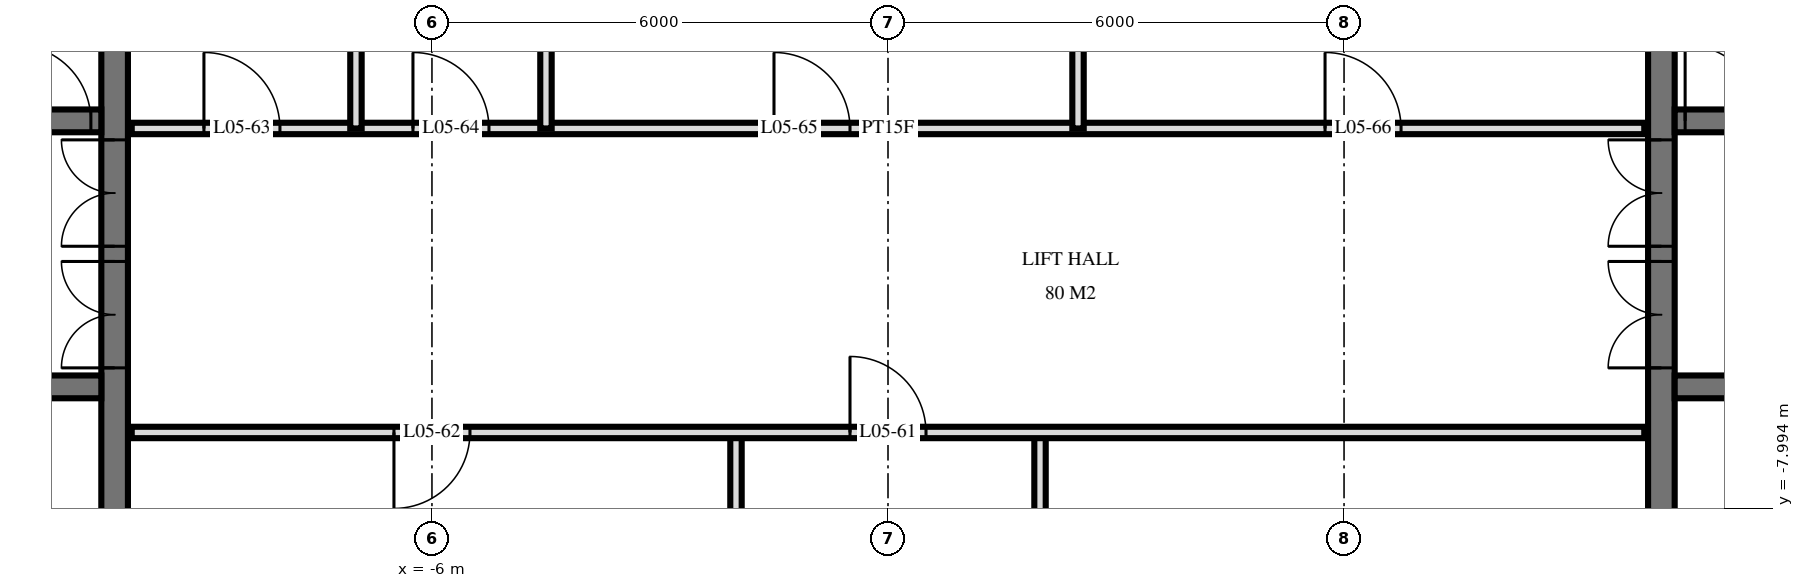
"""IFC4 building model, lengths in metres.
Left out: names, types, materials, properties, quantities, classifications, styles, units other than length and angle.
Written with IfcOpenShell. Run it as: python <this file> out.ifc"""

import sys

from ifc_helpers import new_model, si_unit, direction, frame, frame_2d, origin, place, context, subcontext, project, spatial, rectangle, extrude, element, fill, save


model = new_model("IFC4")
c1 = context("Model", 3, precision=1e-05, world=origin(), true_north=direction((0.0, 1.0)))
c2 = subcontext(c1, "Body", "Model", "MODEL_VIEW")
j1 = project(units=[si_unit("LENGTHUNIT", "METRE"), si_unit("PLANEANGLEUNIT", "RADIAN")], contexts=[c1])
p1 = place(None, origin())
s1 = spatial("IfcSite", under=j1, at=p1, CompositionType="ELEMENT")
p2 = place(p1, origin())
s2 = spatial("IfcBuilding", under=s1, at=p2, CompositionType="ELEMENT")
p3 = place(p2, frame((0.0, 0.0, 27.6)))
s3 = spatial("IfcBuildingStorey", under=s2, at=p3, CompositionType="ELEMENT", Elevation=27.6)
p4 = place(p3, frame((-10.175, -14.55, 0.0), z_axis=(0.0, 0.0, 1.0), x_axis=(0.0, 1.0, 0.0)))
e1 = element("IfcWall", 1, at=p4, inside=s3, PredefinedType="SHEAR", context=c2, shape_type="SweptSolid", body=[
    extrude(rectangle(XDim=14.1, YDim=0.35, at=frame_2d((7.05, 0.0))), origin(), (0.0, 0.0, 1.0), 3.6),
])
p5 = place(p4, frame((8.4, 0.0, 0.0)))
e2 = element("IfcOpeningElement", 2, at=p5, cuts=e1, PredefinedType="OPENING", context=c2, shape_type="SweptSolid", body=[
    extrude(rectangle(XDim=1.4, YDim=2.4, at=frame_2d((0.7, 1.2))), frame((0.0, 0.185, 0.0), z_axis=(0.0, -1.0, 0.0), x_axis=(1.0, 0.0, 0.0)), (0.0, 0.0, 1.0), 0.37),
])
p6 = place(p4, frame((10.0, 0.0, 0.0)))
e3 = element("IfcOpeningElement", 3, at=p6, cuts=e1, PredefinedType="OPENING", context=c2, shape_type="SweptSolid", body=[
    extrude(rectangle(XDim=1.4, YDim=2.4, at=frame_2d((0.7, 1.2))), frame((0.0, 0.185, 0.0), z_axis=(0.0, -1.0, 0.0), x_axis=(1.0, 0.0, 0.0)), (0.0, 0.0, 1.0), 0.37),
])
p7 = place(p4, frame((4.0, 0.0, 0.0)))
e4 = element("IfcOpeningElement", 4, at=p7, cuts=e1, PredefinedType="OPENING", context=c2, shape_type="SweptSolid", body=[
    extrude(rectangle(XDim=1.2, YDim=2.1, at=frame_2d((0.6, 1.05))), frame((0.0, 0.185, 0.0), z_axis=(0.0, -1.0, 0.0), x_axis=(1.0, 0.0, 0.0)), (0.0, 0.0, 1.0), 0.37),
])
p8 = place(p3, frame((-29.05, -2.9, 0.0), z_axis=(0.0, 0.0, 1.0), x_axis=(1.0, 0.0, 0.0)))
e5 = element("IfcWall", 5, at=p8, inside=s3, PredefinedType="SHEAR", context=c2, shape_type="SweptSolid", body=[
    extrude(rectangle(XDim=18.7, YDim=0.3, at=frame_2d((9.35, 0.0))), origin(), (0.0, 0.0, 1.0), 3.6),
])
p9 = place(p8, frame((2.95, 0.0, 0.0)))
e6 = element("IfcOpeningElement", 6, at=p9, cuts=e5, PredefinedType="OPENING", context=c2, shape_type="SweptSolid", body=[
    extrude(rectangle(XDim=1.1, YDim=2.1, at=frame_2d((0.55, 1.05))), frame((0.0, 0.16, 0.0), z_axis=(0.0, -1.0, 0.0), x_axis=(1.0, 0.0, 0.0)), (0.0, 0.0, 1.0), 0.32),
])
p10 = place(p8, frame((0.55, 0.0, 0.0)))
e7 = element("IfcOpeningElement", 7, at=p10, cuts=e5, PredefinedType="OPENING", context=c2, shape_type="SweptSolid", body=[
    extrude(rectangle(XDim=1.1, YDim=2.1, at=frame_2d((0.55, 1.05))), frame((0.0, 0.16, 0.0), z_axis=(0.0, -1.0, 0.0), x_axis=(1.0, 0.0, 0.0)), (0.0, 0.0, 1.0), 0.32),
])
p11 = place(p8, frame((11.613, 0.0, 0.0)))
e8 = element("IfcOpeningElement", 8, at=p11, cuts=e5, PredefinedType="OPENING", context=c2, shape_type="SweptSolid", body=[
    extrude(rectangle(XDim=0.9, YDim=2.1, at=frame_2d((0.45, 1.05))), frame((0.0, 0.16, 0.0), z_axis=(0.0, -1.0, 0.0), x_axis=(1.0, 0.0, 0.0)), (0.0, 0.0, 1.0), 0.32),
])
p12 = place(p8, frame((10.188, 0.0, 0.0)))
e9 = element("IfcOpeningElement", 9, at=p12, cuts=e5, PredefinedType="OPENING", context=c2, shape_type="SweptSolid", body=[
    extrude(rectangle(XDim=0.9, YDim=2.1, at=frame_2d((0.45, 1.05))), frame((0.0, 0.16, 0.0), z_axis=(0.0, -1.0, 0.0), x_axis=(1.0, 0.0, 0.0)), (0.0, 0.0, 1.0), 0.32),
])
p13 = place(p8, frame((17.562, 0.0, 0.0)))
e10 = element("IfcOpeningElement", 10, at=p13, cuts=e5, PredefinedType="OPENING", context=c2, shape_type="SweptSolid", body=[
    extrude(rectangle(XDim=1.0, YDim=2.1, at=frame_2d((0.5, 1.05))), frame((0.0, 0.16, 0.0), z_axis=(0.0, -1.0, 0.0), x_axis=(1.0, 0.0, 0.0)), (0.0, 0.0, 1.0), 0.32),
])
p14 = place(p8, frame((16.137, 0.0, 0.0)))
e11 = element("IfcOpeningElement", 11, at=p14, cuts=e5, PredefinedType="OPENING", context=c2, shape_type="SweptSolid", body=[
    extrude(rectangle(XDim=1.0, YDim=2.1, at=frame_2d((0.5, 1.05))), frame((0.0, 0.16, 0.0), z_axis=(0.0, -1.0, 0.0), x_axis=(1.0, 0.0, 0.0)), (0.0, 0.0, 1.0), 0.32),
])
p15 = place(p8, frame((13.85, 0.0, 0.0)))
e12 = element("IfcOpeningElement", 12, at=p15, cuts=e5, PredefinedType="OPENING", context=c2, shape_type="SweptSolid", body=[
    extrude(rectangle(XDim=1.0, YDim=2.1, at=frame_2d((0.5, 1.05))), frame((0.0, 0.16, 0.0), z_axis=(0.0, -1.0, 0.0), x_axis=(1.0, 0.0, 0.0)), (0.0, 0.0, 1.0), 0.32),
])
p16 = place(p8, frame((5.6, 0.0, 0.0)))
e13 = element("IfcOpeningElement", 13, at=p16, cuts=e5, PredefinedType="OPENING", context=c2, shape_type="SweptSolid", body=[
    extrude(rectangle(XDim=1.0, YDim=2.1, at=frame_2d((0.5, 1.05))), frame((0.0, 0.16, 0.0), z_axis=(0.0, -1.0, 0.0), x_axis=(1.0, 0.0, 0.0)), (0.0, 0.0, 1.0), 0.32),
])
p17 = place(p3, frame((-29.05, -6.4, 0.0), z_axis=(0.0, 0.0, 1.0), x_axis=(1.0, 0.0, 0.0)))
e14 = element("IfcWall", 14, at=p17, inside=s3, PredefinedType="SHEAR", context=c2, shape_type="SweptSolid", body=[
    extrude(rectangle(XDim=18.7, YDim=0.3, at=frame_2d((9.35, 0.0))), origin(), (0.0, 0.0, 1.0), 3.6),
])
p18 = place(p17, frame((2.95, 0.0, 0.0)))
e15 = element("IfcOpeningElement", 15, at=p18, cuts=e14, PredefinedType="OPENING", context=c2, shape_type="SweptSolid", body=[
    extrude(rectangle(XDim=1.1, YDim=2.1, at=frame_2d((0.55, 1.05))), frame((0.0, 0.16, 0.0), z_axis=(0.0, -1.0, 0.0), x_axis=(1.0, 0.0, 0.0)), (0.0, 0.0, 1.0), 0.32),
])
p19 = place(p17, frame((0.55, 0.0, 0.0)))
e16 = element("IfcOpeningElement", 16, at=p19, cuts=e14, PredefinedType="OPENING", context=c2, shape_type="SweptSolid", body=[
    extrude(rectangle(XDim=1.1, YDim=2.1, at=frame_2d((0.55, 1.05))), frame((0.0, 0.16, 0.0), z_axis=(0.0, -1.0, 0.0), x_axis=(1.0, 0.0, 0.0)), (0.0, 0.0, 1.0), 0.32),
])
p20 = place(p17, frame((10.8, 0.0, 0.0)))
e17 = element("IfcOpeningElement", 17, at=p20, cuts=e14, PredefinedType="OPENING", context=c2, shape_type="SweptSolid", body=[
    extrude(rectangle(XDim=1.1, YDim=2.1, at=frame_2d((0.55, 1.05))), frame((0.0, 0.16, 0.0), z_axis=(0.0, -1.0, 0.0), x_axis=(1.0, 0.0, 0.0)), (0.0, 0.0, 1.0), 0.32),
])
p21 = place(p17, frame((5.6, 0.0, 0.0)))
e18 = element("IfcOpeningElement", 18, at=p21, cuts=e14, PredefinedType="OPENING", context=c2, shape_type="SweptSolid", body=[
    extrude(rectangle(XDim=1.0, YDim=2.1, at=frame_2d((0.5, 1.05))), frame((0.0, 0.16, 0.0), z_axis=(0.0, -1.0, 0.0), x_axis=(1.0, 0.0, 0.0)), (0.0, 0.0, 1.0), 0.32),
])
p22 = place(p3, frame((10.175, -14.55, 0.0), z_axis=(0.0, 0.0, 1.0), x_axis=(0.0, 1.0, 0.0)))
e19 = element("IfcWall", 19, at=p22, inside=s3, PredefinedType="SHEAR", context=c2, shape_type="SweptSolid", body=[
    extrude(rectangle(XDim=14.1, YDim=0.35, at=frame_2d((7.05, 0.0))), origin(), (0.0, 0.0, 1.0), 3.6),
])
p23 = place(p22, frame((8.4, 0.0, 0.0)))
e20 = element("IfcOpeningElement", 20, at=p23, cuts=e19, PredefinedType="OPENING", context=c2, shape_type="SweptSolid", body=[
    extrude(rectangle(XDim=1.4, YDim=2.4, at=frame_2d((0.7, 1.2))), frame((0.0, 0.185, 0.0), z_axis=(0.0, -1.0, 0.0), x_axis=(1.0, 0.0, 0.0)), (0.0, 0.0, 1.0), 0.37),
])
p24 = place(p22, frame((10.0, 0.0, 0.0)))
e21 = element("IfcOpeningElement", 21, at=p24, cuts=e19, PredefinedType="OPENING", context=c2, shape_type="SweptSolid", body=[
    extrude(rectangle(XDim=1.4, YDim=2.4, at=frame_2d((0.7, 1.2))), frame((0.0, 0.185, 0.0), z_axis=(0.0, -1.0, 0.0), x_axis=(1.0, 0.0, 0.0)), (0.0, 0.0, 1.0), 0.37),
])
p25 = place(p22, frame((4.0, 0.0, 0.0)))
e22 = element("IfcOpeningElement", 22, at=p25, cuts=e19, PredefinedType="OPENING", context=c2, shape_type="SweptSolid", body=[
    extrude(rectangle(XDim=1.2, YDim=2.1, at=frame_2d((0.6, 1.05))), frame((0.0, 0.185, 0.0), z_axis=(0.0, -1.0, 0.0), x_axis=(1.0, 0.0, 0.0)), (0.0, 0.0, 1.0), 0.37),
])
p26 = place(p3, frame((10.35, -2.9, 0.0), z_axis=(0.0, 0.0, 1.0), x_axis=(1.0, 0.0, 0.0)))
e23 = element("IfcWall", 23, at=p26, inside=s3, PredefinedType="SHEAR", context=c2, shape_type="SweptSolid", body=[
    extrude(rectangle(XDim=18.7, YDim=0.3, at=frame_2d((9.35, 0.0))), origin(), (0.0, 0.0, 1.0), 3.6),
])
p27 = place(p26, frame((14.65, 0.0, 0.0)))
e24 = element("IfcOpeningElement", 24, at=p27, cuts=e23, PredefinedType="OPENING", context=c2, shape_type="SweptSolid", body=[
    extrude(rectangle(XDim=1.1, YDim=2.1, at=frame_2d((0.55, 1.05))), frame((0.0, 0.16, 0.0), z_axis=(0.0, -1.0, 0.0), x_axis=(1.0, 0.0, 0.0)), (0.0, 0.0, 1.0), 0.32),
])
p28 = place(p26, frame((17.05, 0.0, 0.0)))
e25 = element("IfcOpeningElement", 25, at=p28, cuts=e23, PredefinedType="OPENING", context=c2, shape_type="SweptSolid", body=[
    extrude(rectangle(XDim=1.1, YDim=2.1, at=frame_2d((0.55, 1.05))), frame((0.0, 0.16, 0.0), z_axis=(0.0, -1.0, 0.0), x_axis=(1.0, 0.0, 0.0)), (0.0, 0.0, 1.0), 0.32),
])
p29 = place(p26, frame((6.188, 0.0, 0.0)))
e26 = element("IfcOpeningElement", 26, at=p29, cuts=e23, PredefinedType="OPENING", context=c2, shape_type="SweptSolid", body=[
    extrude(rectangle(XDim=0.9, YDim=2.1, at=frame_2d((0.45, 1.05))), frame((0.0, 0.16, 0.0), z_axis=(0.0, -1.0, 0.0), x_axis=(1.0, 0.0, 0.0)), (0.0, 0.0, 1.0), 0.32),
])
p30 = place(p26, frame((7.613, 0.0, 0.0)))
e27 = element("IfcOpeningElement", 27, at=p30, cuts=e23, PredefinedType="OPENING", context=c2, shape_type="SweptSolid", body=[
    extrude(rectangle(XDim=0.9, YDim=2.1, at=frame_2d((0.45, 1.05))), frame((0.0, 0.16, 0.0), z_axis=(0.0, -1.0, 0.0), x_axis=(1.0, 0.0, 0.0)), (0.0, 0.0, 1.0), 0.32),
])
p31 = place(p26, frame((0.137, 0.0, 0.0)))
e28 = element("IfcOpeningElement", 28, at=p31, cuts=e23, PredefinedType="OPENING", context=c2, shape_type="SweptSolid", body=[
    extrude(rectangle(XDim=1.0, YDim=2.1, at=frame_2d((0.5, 1.05))), frame((0.0, 0.16, 0.0), z_axis=(0.0, -1.0, 0.0), x_axis=(1.0, 0.0, 0.0)), (0.0, 0.0, 1.0), 0.32),
])
p32 = place(p26, frame((1.562, 0.0, 0.0)))
e29 = element("IfcOpeningElement", 29, at=p32, cuts=e23, PredefinedType="OPENING", context=c2, shape_type="SweptSolid", body=[
    extrude(rectangle(XDim=1.0, YDim=2.1, at=frame_2d((0.5, 1.05))), frame((0.0, 0.16, 0.0), z_axis=(0.0, -1.0, 0.0), x_axis=(1.0, 0.0, 0.0)), (0.0, 0.0, 1.0), 0.32),
])
p33 = place(p26, frame((3.85, 0.0, 0.0)))
e30 = element("IfcOpeningElement", 30, at=p33, cuts=e23, PredefinedType="OPENING", context=c2, shape_type="SweptSolid", body=[
    extrude(rectangle(XDim=1.0, YDim=2.1, at=frame_2d((0.5, 1.05))), frame((0.0, 0.16, 0.0), z_axis=(0.0, -1.0, 0.0), x_axis=(1.0, 0.0, 0.0)), (0.0, 0.0, 1.0), 0.32),
])
p34 = place(p26, frame((12.1, 0.0, 0.0)))
e31 = element("IfcOpeningElement", 31, at=p34, cuts=e23, PredefinedType="OPENING", context=c2, shape_type="SweptSolid", body=[
    extrude(rectangle(XDim=1.0, YDim=2.1, at=frame_2d((0.5, 1.05))), frame((0.0, 0.16, 0.0), z_axis=(0.0, -1.0, 0.0), x_axis=(1.0, 0.0, 0.0)), (0.0, 0.0, 1.0), 0.32),
])
p35 = place(p3, frame((10.35, -6.4, 0.0), z_axis=(0.0, 0.0, 1.0), x_axis=(1.0, 0.0, 0.0)))
e32 = element("IfcWall", 32, at=p35, inside=s3, PredefinedType="SHEAR", context=c2, shape_type="SweptSolid", body=[
    extrude(rectangle(XDim=18.7, YDim=0.3, at=frame_2d((9.35, 0.0))), origin(), (0.0, 0.0, 1.0), 3.6),
])
p36 = place(p35, frame((14.65, 0.0, 0.0)))
e33 = element("IfcOpeningElement", 33, at=p36, cuts=e32, PredefinedType="OPENING", context=c2, shape_type="SweptSolid", body=[
    extrude(rectangle(XDim=1.1, YDim=2.1, at=frame_2d((0.55, 1.05))), frame((0.0, 0.16, 0.0), z_axis=(0.0, -1.0, 0.0), x_axis=(1.0, 0.0, 0.0)), (0.0, 0.0, 1.0), 0.32),
])
p37 = place(p35, frame((17.05, 0.0, 0.0)))
e34 = element("IfcOpeningElement", 34, at=p37, cuts=e32, PredefinedType="OPENING", context=c2, shape_type="SweptSolid", body=[
    extrude(rectangle(XDim=1.1, YDim=2.1, at=frame_2d((0.55, 1.05))), frame((0.0, 0.16, 0.0), z_axis=(0.0, -1.0, 0.0), x_axis=(1.0, 0.0, 0.0)), (0.0, 0.0, 1.0), 0.32),
])
p38 = place(p35, frame((6.8, 0.0, 0.0)))
e35 = element("IfcOpeningElement", 35, at=p38, cuts=e32, PredefinedType="OPENING", context=c2, shape_type="SweptSolid", body=[
    extrude(rectangle(XDim=1.1, YDim=2.1, at=frame_2d((0.55, 1.05))), frame((0.0, 0.16, 0.0), z_axis=(0.0, -1.0, 0.0), x_axis=(1.0, 0.0, 0.0)), (0.0, 0.0, 1.0), 0.32),
])
p39 = place(p35, frame((12.1, 0.0, 0.0)))
e36 = element("IfcOpeningElement", 36, at=p39, cuts=e32, PredefinedType="OPENING", context=c2, shape_type="SweptSolid", body=[
    extrude(rectangle(XDim=1.0, YDim=2.1, at=frame_2d((0.5, 1.05))), frame((0.0, 0.16, 0.0), z_axis=(0.0, -1.0, 0.0), x_axis=(1.0, 0.0, 0.0)), (0.0, 0.0, 1.0), 0.32),
])
p40 = place(p3, frame((2.5, -3.0, 0.0), z_axis=(0.0, 0.0, 1.0), x_axis=(0.0, 1.0, 0.0)))
e37 = element("IfcWall", 37, at=p40, inside=s3, PredefinedType="PARTITIONING", context=c2, shape_type="SweptSolid", body=[
    extrude(rectangle(XDim=4.02, YDim=0.15, at=frame_2d((2.01, 0.0))), origin(), (0.0, 0.0, 1.0), 3.32),
])
for number, where, z_axis, x_axis in (
    (38, (2.0, -11.0, 0.0), (0.0, 0.0, 1.0), (0.0, 1.0, 0.0)),
    (39, (-2.0, -11.0, 0.0), (0.0, 0.0, 1.0), (0.0, 1.0, 0.0)),
):
    element("IfcWall", number, at=place(p3, frame(where, z_axis=z_axis, x_axis=x_axis)), inside=s3, PredefinedType="PARTITIONING", context=c2, shape_type="SweptSolid", body=[
        extrude(rectangle(XDim=4.0, YDim=0.15, at=frame_2d((2.0, 0.0))), origin(), (0.0, 0.0, 1.0), 3.32),
    ])
for number, where, z_axis, x_axis in (
    (40, (-4.5, -3.0, 0.0), (0.0, 0.0, 1.0), (0.0, 1.0, 0.0)),
    (41, (-7.0, -3.0, 0.0), (0.0, 0.0, 1.0), (0.0, 1.0, 0.0)),
):
    element("IfcWall", number, at=place(p3, frame(where, z_axis=z_axis, x_axis=x_axis)), inside=s3, PredefinedType="PLUMBINGWALL", context=c2, shape_type="SweptSolid", body=[
        extrude(rectangle(XDim=4.02, YDim=0.15, at=frame_2d((2.01, 0.0))), origin(), (0.0, 0.0, 1.0), 3.32),
    ])
p41 = place(p3, frame((-9.95, -7.0, 0.0), z_axis=(0.0, 0.0, 1.0), x_axis=(1.0, 0.0, 0.0)))
e42 = element("IfcWall", 42, at=p41, inside=s3, PredefinedType="PARTITIONING", context=c2, shape_type="SweptSolid", body=[
    extrude(rectangle(XDim=19.9, YDim=0.15, at=frame_2d((9.95, 0.0))), origin(), (0.0, 0.0, 1.0), 3.32),
])
p42 = place(p41, frame((9.45, 0.0, 0.0)))
e43 = element("IfcOpeningElement", 43, at=p42, cuts=e42, PredefinedType="OPENING", context=c2, shape_type="SweptSolid", body=[
    extrude(rectangle(XDim=1.0, YDim=2.1, at=frame_2d((0.5, 1.05))), frame((0.0, 0.085, 0.0), z_axis=(0.0, -1.0, 0.0), x_axis=(1.0, 0.0, 0.0)), (0.0, 0.0, 1.0), 0.17),
])
p43 = place(p41, frame((3.45, 0.0, 0.0)))
e44 = element("IfcOpeningElement", 44, at=p43, cuts=e42, PredefinedType="OPENING", context=c2, shape_type="SweptSolid", body=[
    extrude(rectangle(XDim=1.0, YDim=2.1, at=frame_2d((0.5, 1.05))), frame((0.0, 0.085, 0.0), z_axis=(0.0, -1.0, 0.0), x_axis=(1.0, 0.0, 0.0)), (0.0, 0.0, 1.0), 0.17),
])
p44 = place(p3, frame((-9.95, -3.0, 0.0), z_axis=(0.0, 0.0, 1.0), x_axis=(1.0, 0.0, 0.0)))
e45 = element("IfcWall", 45, at=p44, inside=s3, PredefinedType="PARTITIONING", context=c2, shape_type="SweptSolid", body=[
    extrude(rectangle(XDim=19.9, YDim=0.15, at=frame_2d((9.95, 0.0))), origin(), (0.0, 0.0, 1.0), 3.32),
])
p45 = place(p44, frame((0.95, 0.0, 0.0)))
e46 = element("IfcOpeningElement", 46, at=p45, cuts=e45, PredefinedType="OPENING", context=c2, shape_type="SweptSolid", body=[
    extrude(rectangle(XDim=1.0, YDim=2.1, at=frame_2d((0.5, 1.05))), frame((0.0, 0.085, 0.0), z_axis=(0.0, -1.0, 0.0), x_axis=(1.0, 0.0, 0.0)), (0.0, 0.0, 1.0), 0.17),
])
p46 = place(p44, frame((3.7, 0.0, 0.0)))
e47 = element("IfcOpeningElement", 47, at=p46, cuts=e45, PredefinedType="OPENING", context=c2, shape_type="SweptSolid", body=[
    extrude(rectangle(XDim=1.0, YDim=2.1, at=frame_2d((0.5, 1.05))), frame((0.0, 0.085, 0.0), z_axis=(0.0, -1.0, 0.0), x_axis=(1.0, 0.0, 0.0)), (0.0, 0.0, 1.0), 0.17),
])
p47 = place(p44, frame((8.45, 0.0, 0.0)))
e48 = element("IfcOpeningElement", 48, at=p47, cuts=e45, PredefinedType="OPENING", context=c2, shape_type="SweptSolid", body=[
    extrude(rectangle(XDim=1.0, YDim=2.1, at=frame_2d((0.5, 1.05))), frame((0.0, 0.085, 0.0), z_axis=(0.0, -1.0, 0.0), x_axis=(1.0, 0.0, 0.0)), (0.0, 0.0, 1.0), 0.17),
])
p48 = place(p44, frame((15.7, 0.0, 0.0)))
e49 = element("IfcOpeningElement", 49, at=p48, cuts=e45, PredefinedType="OPENING", context=c2, shape_type="SweptSolid", body=[
    extrude(rectangle(XDim=1.0, YDim=2.1, at=frame_2d((0.5, 1.05))), frame((0.0, 0.085, 0.0), z_axis=(0.0, -1.0, 0.0), x_axis=(1.0, 0.0, 0.0)), (0.0, 0.0, 1.0), 0.17),
])
p49 = place(p5, origin())
e50 = element("IfcDoor", 50, at=p49, inside=s3, OperationType="DOUBLE_DOOR_SINGLE_SWING", PredefinedType="DOOR", context=c2, shape_type="SweptSolid", body=[
    extrude(rectangle(XDim=1.4, YDim=2.4, at=frame_2d((0.7, 1.2))), frame((0.0, 0.025, 0.0), z_axis=(0.0, -1.0, 0.0), x_axis=(1.0, 0.0, 0.0)), (0.0, 0.0, 1.0), 0.05),
])
fill(e2, e50)
p50 = place(p6, origin())
e51 = element("IfcDoor", 51, at=p50, inside=s3, OperationType="DOUBLE_DOOR_SINGLE_SWING", PredefinedType="DOOR", context=c2, shape_type="SweptSolid", body=[
    extrude(rectangle(XDim=1.4, YDim=2.4, at=frame_2d((0.7, 1.2))), frame((0.0, 0.025, 0.0), z_axis=(0.0, -1.0, 0.0), x_axis=(1.0, 0.0, 0.0)), (0.0, 0.0, 1.0), 0.05),
])
fill(e3, e51)
p51 = place(p13, origin())
e52 = element("IfcDoor", 52, at=p51, inside=s3, OperationType="SINGLE_SWING_RIGHT", PredefinedType="DOOR", context=c2, shape_type="SweptSolid", body=[
    extrude(rectangle(XDim=1.0, YDim=2.1, at=frame_2d((0.5, 1.05))), frame((0.0, 0.025, 0.0), z_axis=(0.0, -1.0, 0.0), x_axis=(1.0, 0.0, 0.0)), (0.0, 0.0, 1.0), 0.05),
])
fill(e10, e52)
p52 = place(p23, origin())
e53 = element("IfcDoor", 53, at=p52, inside=s3, OperationType="DOUBLE_DOOR_SINGLE_SWING", PredefinedType="DOOR", context=c2, shape_type="SweptSolid", body=[
    extrude(rectangle(XDim=1.4, YDim=2.4, at=frame_2d((0.7, 1.2))), frame((0.0, 0.025, 0.0), z_axis=(0.0, -1.0, 0.0), x_axis=(1.0, 0.0, 0.0)), (0.0, 0.0, 1.0), 0.05),
])
fill(e20, e53)
p53 = place(p24, origin())
e54 = element("IfcDoor", 54, at=p53, inside=s3, OperationType="DOUBLE_DOOR_SINGLE_SWING", PredefinedType="DOOR", context=c2, shape_type="SweptSolid", body=[
    extrude(rectangle(XDim=1.4, YDim=2.4, at=frame_2d((0.7, 1.2))), frame((0.0, 0.025, 0.0), z_axis=(0.0, -1.0, 0.0), x_axis=(1.0, 0.0, 0.0)), (0.0, 0.0, 1.0), 0.05),
])
fill(e21, e54)
p54 = place(p31, origin())
e55 = element("IfcDoor", 55, at=p54, inside=s3, OperationType="SINGLE_SWING_RIGHT", PredefinedType="DOOR", context=c2, shape_type="SweptSolid", body=[
    extrude(rectangle(XDim=1.0, YDim=2.1, at=frame_2d((0.5, 1.05))), frame((0.0, 0.025, 0.0), z_axis=(0.0, -1.0, 0.0), x_axis=(1.0, 0.0, 0.0)), (0.0, 0.0, 1.0), 0.05),
])
fill(e28, e55)
p55 = place(p42, origin())
e56 = element("IfcDoor", 56, at=p55, inside=s3, OperationType="SINGLE_SWING_RIGHT", PredefinedType="DOOR", context=c2, shape_type="SweptSolid", body=[
    extrude(rectangle(XDim=1.0, YDim=2.1, at=frame_2d((0.5, 1.05))), frame((0.0, 0.025, 0.0), z_axis=(0.0, -1.0, 0.0), x_axis=(1.0, 0.0, 0.0)), (0.0, 0.0, 1.0), 0.05),
])
fill(e43, e56)
p56 = place(p43, frame((0.5, 0.0, 0.0), z_axis=(0.0, 0.0, 1.0), x_axis=(-1.0, 0.0, 0.0)))
e57 = element("IfcDoor", 57, at=p56, inside=s3, OperationType="SINGLE_SWING_LEFT", PredefinedType="DOOR", context=c2, shape_type="SweptSolid", body=[
    extrude(rectangle(XDim=1.0, YDim=2.1, at=frame_2d((0.0, 1.05))), frame((0.0, -0.025, 0.0), z_axis=(0.0, 1.0, 0.0), x_axis=(-1.0, 0.0, 0.0)), (0.0, 0.0, 1.0), 0.05),
])
fill(e44, e57)
p57 = place(p45, origin())
e58 = element("IfcDoor", 58, at=p57, inside=s3, OperationType="SINGLE_SWING_RIGHT", PredefinedType="DOOR", context=c2, shape_type="SweptSolid", body=[
    extrude(rectangle(XDim=1.0, YDim=2.1, at=frame_2d((0.5, 1.05))), frame((0.0, 0.025, 0.0), z_axis=(0.0, -1.0, 0.0), x_axis=(1.0, 0.0, 0.0)), (0.0, 0.0, 1.0), 0.05),
])
fill(e46, e58)
p58 = place(p46, origin())
e59 = element("IfcDoor", 59, at=p58, inside=s3, OperationType="SINGLE_SWING_RIGHT", PredefinedType="DOOR", context=c2, shape_type="SweptSolid", body=[
    extrude(rectangle(XDim=1.0, YDim=2.1, at=frame_2d((0.5, 1.05))), frame((0.0, 0.025, 0.0), z_axis=(0.0, -1.0, 0.0), x_axis=(1.0, 0.0, 0.0)), (0.0, 0.0, 1.0), 0.05),
])
fill(e47, e59)
p59 = place(p47, origin())
e60 = element("IfcDoor", 60, at=p59, inside=s3, OperationType="SINGLE_SWING_RIGHT", PredefinedType="DOOR", context=c2, shape_type="SweptSolid", body=[
    extrude(rectangle(XDim=1.0, YDim=2.1, at=frame_2d((0.5, 1.05))), frame((0.0, 0.025, 0.0), z_axis=(0.0, -1.0, 0.0), x_axis=(1.0, 0.0, 0.0)), (0.0, 0.0, 1.0), 0.05),
])
fill(e48, e60)
p60 = place(p48, origin())
e61 = element("IfcDoor", 61, at=p60, inside=s3, OperationType="SINGLE_SWING_RIGHT", PredefinedType="DOOR", context=c2, shape_type="SweptSolid", body=[
    extrude(rectangle(XDim=1.0, YDim=2.1, at=frame_2d((0.5, 1.05))), frame((0.0, 0.025, 0.0), z_axis=(0.0, -1.0, 0.0), x_axis=(1.0, 0.0, 0.0)), (0.0, 0.0, 1.0), 0.05),
])
fill(e49, e61)
save(model, sys.argv[1])
